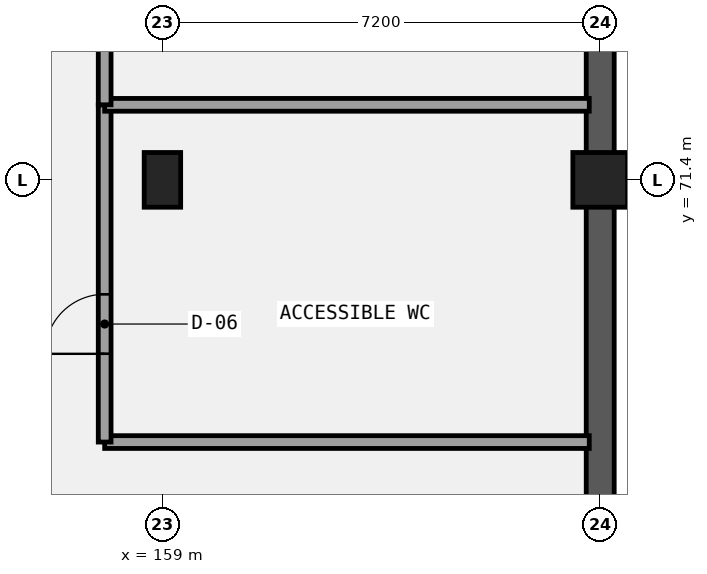
"""IFC4 building model, lengths in metres.
Left out: names, types, materials, properties, quantities, classifications, styles, units other than length and angle.
Written with IfcOpenShell. Run it as: python <this file> out.ifc"""

import sys

from ifc_helpers import new_model, si_unit, direction, frame, frame_2d, origin, origin_2d, place, context, subcontext, project, spatial, rectangle, extrude, element, fill, save


model = new_model("IFC4")
c1 = context("Model", 3, precision=1e-05, world=origin(), true_north=direction((0.0, 1.0)))
c2 = subcontext(c1, "Body", "Model", "MODEL_VIEW")
j1 = project(units=[si_unit("LENGTHUNIT", "METRE"), si_unit("PLANEANGLEUNIT", "RADIAN")], contexts=[c1])
p1 = place(None, origin())
s1 = spatial("IfcSite", under=j1, at=p1, CompositionType="ELEMENT")
p2 = place(p1, origin())
s2 = spatial("IfcBuilding", under=s1, at=p2, CompositionType="ELEMENT")
p3 = place(p2, frame((0.0, 0.0, -8.4)))
s3 = spatial("IfcBuildingStorey", under=s2, at=p3, CompositionType="ELEMENT", Elevation=-8.4)
p4 = place(p3, frame((166.2, 78.38, 0.0), z_axis=(0.0, 0.0, 1.0), x_axis=(0.0, -1.0, 0.0)))
e1 = element("IfcWall", 1, at=p4, inside=s3, PredefinedType="USERDEFINED", context=c2, shape_type="SweptSolid", body=[
    extrude(rectangle(XDim=28.35, YDim=0.46, at=frame_2d((14.175, 0.0))), origin(), (0.0, 0.0, 1.0), 2.9),
])
p5 = place(p3, frame((159.0, 71.4, 0.0), z_axis=(0.0, 0.0, 1.0), x_axis=(1.0, 0.0, 0.0)))
e2 = element("IfcColumn", 2, at=p5, inside=s3, PredefinedType="COLUMN", context=c2, shape_type="SweptSolid", body=[
    extrude(rectangle(XDim=0.6, YDim=0.9, at=origin_2d()), origin(), (0.0, 0.0, 1.0), 4.2),
])
p6 = place(p3, frame((166.2, 71.4, 0.0), z_axis=(0.0, 0.0, 1.0), x_axis=(1.0, 0.0, 0.0)))
e3 = element("IfcColumn", 3, at=p6, inside=s3, PredefinedType="COLUMN", context=c2, shape_type="SweptSolid", body=[
    extrude(rectangle(XDim=0.9, YDim=0.9, at=origin_2d()), origin(), (0.0, 0.0, 1.0), 4.2),
])
p7 = place(p3, frame((158.05, 67.088, 0.0), z_axis=(0.0, 0.0, 1.0), x_axis=(1.0, 0.0, 0.0)))
e4 = element("IfcWall", 4, at=p7, inside=s3, PredefinedType="PARTITIONING", context=c2, shape_type="SweptSolid", body=[
    extrude(rectangle(XDim=7.97, YDim=0.21, at=frame_2d((3.985, 0.0))), origin(), (0.0, 0.0, 1.0), 3.9),
])
p8 = place(p3, frame((158.05, 67.088, 0.0), z_axis=(0.0, 0.0, 1.0), x_axis=(0.0, 1.0, 0.0)))
e5 = element("IfcWall", 5, at=p8, inside=s3, PredefinedType="PARTITIONING", context=c2, shape_type="SweptSolid", body=[
    extrude(rectangle(XDim=5.546, YDim=0.21, at=frame_2d((2.773, 0.0))), origin(), (0.0, 0.0, 1.0), 3.9),
])
p9 = place(p8, frame((1.451, 0.0, 0.0)))
e6 = element("IfcOpeningElement", 6, at=p9, cuts=e5, PredefinedType="OPENING", context=c2, shape_type="SweptSolid", body=[
    extrude(rectangle(XDim=0.98, YDim=2.35, at=frame_2d((0.49, 1.175))), frame((0.0, 0.115, 0.0), z_axis=(0.0, -1.0, 0.0), x_axis=(1.0, 0.0, 0.0)), (0.0, 0.0, 1.0), 0.23),
])
p10 = place(p3, frame((158.05, 72.634, 0.0), z_axis=(0.0, 0.0, 1.0), x_axis=(1.0, 0.0, 0.0)))
e7 = element("IfcWall", 7, at=p10, inside=s3, PredefinedType="PARTITIONING", context=c2, shape_type="SweptSolid", body=[
    extrude(rectangle(XDim=7.97, YDim=0.21, at=frame_2d((3.985, 0.0))), origin(), (0.0, 0.0, 1.0), 3.9),
])
p11 = place(p3, frame((158.05, 72.634, 0.0), z_axis=(0.0, 0.0, 1.0), x_axis=(0.0, 1.0, 0.0)))
e8 = element("IfcWall", 8, at=p11, inside=s3, PredefinedType="PARTITIONING", context=c2, shape_type="SweptSolid", body=[
    extrude(rectangle(XDim=5.546, YDim=0.21, at=frame_2d((2.773, 0.0))), origin(), (0.0, 0.0, 1.0), 3.9),
])
p12 = place(p11, frame((2.253, 0.0, 0.0)))
e9 = element("IfcOpeningElement", 9, at=p12, cuts=e8, PredefinedType="OPENING", context=c2, shape_type="SweptSolid", body=[
    extrude(rectangle(XDim=1.04, YDim=2.1, at=frame_2d((0.52, 1.05))), frame((0.0, 0.115, 0.0), z_axis=(0.0, -1.0, 0.0), x_axis=(1.0, 0.0, 0.0)), (0.0, 0.0, 1.0), 0.23),
])
p13 = place(p9, origin())
e10 = element("IfcDoor", 10, at=p13, inside=s3, OperationType="SINGLE_SWING_LEFT", PredefinedType="DOOR", context=c2, shape_type="SweptSolid", body=[
    extrude(rectangle(XDim=0.98, YDim=2.35, at=frame_2d((0.49, 1.175))), frame((0.0, 0.025, 0.0), z_axis=(0.0, -1.0, 0.0), x_axis=(1.0, 0.0, 0.0)), (0.0, 0.0, 1.0), 0.05),
])
fill(e6, e10)
save(model, sys.argv[1])
